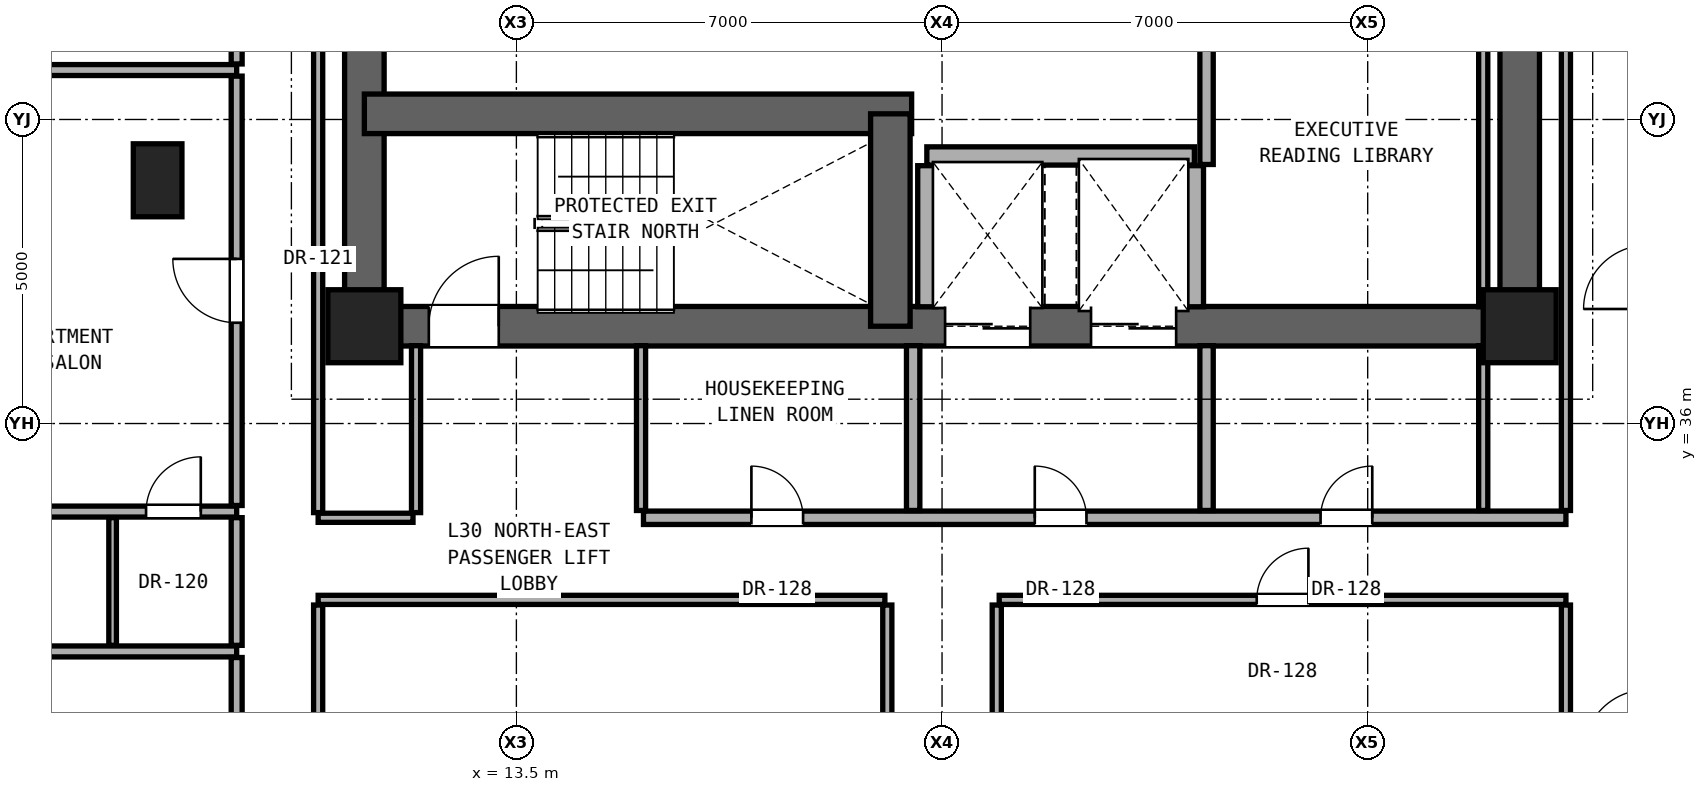
"""IFC4 building model, lengths in metres.
Left out: names, types, materials, properties, quantities, classifications, styles, units other than length and angle.
Written with IfcOpenShell. Run it as: python <this file> out.ifc"""

import sys

from ifc_helpers import new_model, si_unit, direction, frame, frame_2d, origin, origin_2d, place, context, subcontext, project, spatial, rectangle, extrude, element, fill, save


model = new_model("IFC4")
c1 = context("Model", 3, precision=1e-05, world=origin(), true_north=direction((0.0, 1.0)))
c2 = subcontext(c1, "Body", "Model", "MODEL_VIEW")
j1 = project(units=[si_unit("LENGTHUNIT", "METRE"), si_unit("PLANEANGLEUNIT", "RADIAN")], contexts=[c1])
p1 = place(None, origin())
s1 = spatial("IfcSite", under=j1, at=p1, CompositionType="ELEMENT")
p2 = place(p1, origin())
s2 = spatial("IfcBuilding", under=s1, at=p2, CompositionType="ELEMENT")
p3 = place(p2, frame((0.0, 0.0, 108.2)))
s3 = spatial("IfcBuildingStorey", under=s2, at=p3, CompositionType="ELEMENT", Elevation=108.2)
for number, where, z_axis, x_axis in (
    (1, (11.0, 37.6, 0.0), (0.0, 0.0, 1.0), (1.0, 0.0, 0.0)),
    (2, (30.0, 37.6, 0.0), (0.0, 0.0, 1.0), (1.0, 0.0, 0.0)),
):
    element("IfcColumn", number, at=place(p3, frame(where, z_axis=z_axis, x_axis=x_axis)), inside=s3, PredefinedType="COLUMN", context=c2, shape_type="SweptSolid", body=[
        extrude(rectangle(XDim=1.2, YDim=1.2, at=origin_2d()), origin(), (0.0, 0.0, 1.0), 3.3),
    ])
p4 = place(p3, frame((7.6, 40.0, 0.0), z_axis=(0.0, 0.0, 1.0), x_axis=(1.0, 0.0, 0.0)))
e3 = element("IfcColumn", 3, at=p4, inside=s3, PredefinedType="PILASTER", context=c2, shape_type="SweptSolid", body=[
    extrude(rectangle(XDim=0.8, YDim=1.2, at=origin_2d()), origin(), (0.0, 0.0, 1.0), 3.3),
])
for number, where, z_axis, x_axis in (
    (4, (11.0, 37.6, 0.0), (0.0, 0.0, 1.0), (0.0, 1.0, 0.0)),
    (5, (30.0, 37.6, 0.0), (0.0, 0.0, 1.0), (0.0, 1.0, 0.0)),
):
    element("IfcWall", number, at=place(p3, frame(where, z_axis=z_axis, x_axis=x_axis)), inside=s3, PredefinedType="SHEAR", context=c2, shape_type="SweptSolid", body=[
        extrude(rectangle(XDim=6.0, YDim=0.65, at=frame_2d((3.0, 0.0))), origin(), (0.0, 0.0, 1.0), 3.08),
    ])
p5 = place(p3, frame((11.0, 37.6, 0.0), z_axis=(0.0, 0.0, 1.0), x_axis=(1.0, 0.0, 0.0)))
e6 = element("IfcWall", 6, at=p5, inside=s3, PredefinedType="SHEAR", context=c2, shape_type="SweptSolid", body=[
    extrude(rectangle(XDim=19.0, YDim=0.65, at=frame_2d((9.5, 0.0))), origin(), (0.0, 0.0, 1.0), 3.08),
])
p6 = place(p5, frame((1.06, 0.0, 0.0)))
e7 = element("IfcOpeningElement", 7, at=p6, cuts=e6, PredefinedType="OPENING", context=c2, shape_type="SweptSolid", body=[
    extrude(rectangle(XDim=1.15, YDim=2.2, at=frame_2d((0.575, 1.1))), frame((0.0, 0.335, 0.0), z_axis=(0.0, -1.0, 0.0), x_axis=(1.0, 0.0, 0.0)), (0.0, 0.0, 1.0), 0.67),
])
p7 = place(p5, frame((9.55, 0.0, 0.0)))
e8 = element("IfcOpeningElement", 8, at=p7, cuts=e6, PredefinedType="OPENING", context=c2, shape_type="SweptSolid", body=[
    extrude(rectangle(XDim=1.4, YDim=2.35, at=frame_2d((0.7, 1.175))), frame((0.0, 0.335, 0.0), z_axis=(0.0, -1.0, 0.0), x_axis=(1.0, 0.0, 0.0)), (0.0, 0.0, 1.0), 0.67),
])
p8 = place(p5, frame((11.95, 0.0, 0.0)))
e9 = element("IfcOpeningElement", 9, at=p8, cuts=e6, PredefinedType="OPENING", context=c2, shape_type="SweptSolid", body=[
    extrude(rectangle(XDim=1.4, YDim=2.35, at=frame_2d((0.7, 1.175))), frame((0.0, 0.335, 0.0), z_axis=(0.0, -1.0, 0.0), x_axis=(1.0, 0.0, 0.0)), (0.0, 0.0, 1.0), 0.67),
])
p9 = place(p3, frame((11.0, 41.093, 0.0), z_axis=(0.0, 0.0, 1.0), x_axis=(1.0, 0.0, 0.0)))
e10 = element("IfcWall", 10, at=p9, inside=s3, PredefinedType="SHEAR", context=c2, shape_type="SweptSolid", body=[
    extrude(rectangle(XDim=9.0, YDim=0.65, at=frame_2d((4.5, 0.0))), origin(), (0.0, 0.0, 1.0), 3.08),
])
p10 = place(p3, frame((19.65, 37.6, 0.0), z_axis=(0.0, 0.0, 1.0), x_axis=(0.0, 1.0, 0.0)))
e11 = element("IfcWall", 11, at=p10, inside=s3, PredefinedType="SHEAR", context=c2, shape_type="SweptSolid", body=[
    extrude(rectangle(XDim=3.493, YDim=0.65, at=frame_2d((1.747, 0.0))), origin(), (0.0, 0.0, 1.0), 3.08),
])
p11 = place(p3, frame((-1.41, 32.252, 0.0), z_axis=(0.0, 0.0, 1.0), x_axis=(1.0, 0.0, 0.0)))
e12 = element("IfcWall", 12, at=p11, inside=s3, PredefinedType="PARTITIONING", context=c2, shape_type="SweptSolid", body=[
    extrude(rectangle(XDim=10.31, YDim=0.18, at=frame_2d((5.155, 0.0))), origin(), (0.0, 0.0, 1.0), 2.145),
])
p12 = place(p3, frame((10.24, 33.1, 0.0), z_axis=(0.0, 0.0, 1.0), x_axis=(1.0, 0.0, 0.0)))
e13 = element("IfcWall", 13, at=p12, inside=s3, PredefinedType="PARTITIONING", context=c2, shape_type="SweptSolid", body=[
    extrude(rectangle(XDim=9.32, YDim=0.15, at=frame_2d((4.66, 0.0))), origin(), (0.0, 0.0, 1.0), 2.124),
])
p13 = place(p3, frame((21.44, 33.1, 0.0), z_axis=(0.0, 0.0, 1.0), x_axis=(1.0, 0.0, 0.0)))
e14 = element("IfcWall", 14, at=p13, inside=s3, PredefinedType="PARTITIONING", context=c2, shape_type="SweptSolid", body=[
    extrude(rectangle(XDim=9.32, YDim=0.15, at=frame_2d((4.66, 0.0))), origin(), (0.0, 0.0, 1.0), 2.124),
])
p14 = place(p13, frame((4.235, 0.0, 0.0)))
e15 = element("IfcOpeningElement", 15, at=p14, cuts=e14, PredefinedType="OPENING", context=c2, shape_type="SweptSolid", body=[
    extrude(rectangle(XDim=0.85, YDim=2.01, at=frame_2d((0.425, 1.005))), frame((0.0, 0.085, 0.0), z_axis=(0.0, -1.0, 0.0), x_axis=(1.0, 0.0, 0.0)), (0.0, 0.0, 1.0), 0.17),
])
p15 = place(p3, frame((-1.41, 34.552, 0.0), z_axis=(0.0, 0.0, 1.0), x_axis=(1.0, 0.0, 0.0)))
e16 = element("IfcWall", 16, at=p15, inside=s3, PredefinedType="PARTITIONING", context=c2, shape_type="SweptSolid", body=[
    extrude(rectangle(XDim=10.31, YDim=0.18, at=frame_2d((5.155, 0.0))), origin(), (0.0, 0.0, 1.0), 2.145),
])
p16 = place(p15, frame((3.73, 0.0, 0.0)))
e17 = element("IfcOpeningElement", 17, at=p16, cuts=e16, PredefinedType="OPENING", context=c2, shape_type="SweptSolid", body=[
    extrude(rectangle(XDim=0.85, YDim=2.01, at=frame_2d((0.425, 1.005))), frame((0.0, 0.1, 0.0), z_axis=(0.0, -1.0, 0.0), x_axis=(1.0, 0.0, 0.0)), (0.0, 0.0, 1.0), 0.2),
])
p17 = place(p15, frame((8.82, 0.0, 0.0)))
e18 = element("IfcOpeningElement", 18, at=p17, cuts=e16, PredefinedType="OPENING", context=c2, shape_type="SweptSolid", body=[
    extrude(rectangle(XDim=0.9, YDim=2.1, at=frame_2d((0.45, 1.05))), frame((0.0, 0.1, 0.0), z_axis=(0.0, -1.0, 0.0), x_axis=(1.0, 0.0, 0.0)), (0.0, 0.0, 1.0), 0.2),
])
p18 = place(p3, frame((10.24, 34.45, 0.0), z_axis=(0.0, 0.0, 1.0), x_axis=(1.0, 0.0, 0.0)))
e19 = element("IfcWall", 19, at=p18, inside=s3, PredefinedType="PARTITIONING", context=c2, shape_type="SweptSolid", body=[
    extrude(rectangle(XDim=1.56, YDim=0.15, at=frame_2d((0.78, 0.0))), origin(), (0.0, 0.0, 1.0), 2.124),
])
p19 = place(p3, frame((15.59, 34.45, 0.0), z_axis=(0.0, 0.0, 1.0), x_axis=(1.0, 0.0, 0.0)))
e20 = element("IfcWall", 20, at=p19, inside=s3, PredefinedType="SOLIDWALL", context=c2, shape_type="SweptSolid", body=[
    extrude(rectangle(XDim=15.17, YDim=0.22, at=frame_2d((7.585, 0.0))), origin(), (0.0, 0.0, 1.0), 2.124),
])
p20 = place(p19, frame((6.435, 0.0, 0.0)))
e21 = element("IfcOpeningElement", 21, at=p20, cuts=e20, PredefinedType="OPENING", context=c2, shape_type="SweptSolid", body=[
    extrude(rectangle(XDim=0.85, YDim=2.01, at=frame_2d((0.425, 1.005))), frame((0.0, 0.12, 0.0), z_axis=(0.0, -1.0, 0.0), x_axis=(1.0, 0.0, 0.0)), (0.0, 0.0, 1.0), 0.24),
])
p21 = place(p19, frame((11.135, 0.0, 0.0)))
e22 = element("IfcOpeningElement", 22, at=p21, cuts=e20, PredefinedType="OPENING", context=c2, shape_type="SweptSolid", body=[
    extrude(rectangle(XDim=0.85, YDim=2.01, at=frame_2d((0.425, 1.005))), frame((0.0, 0.12, 0.0), z_axis=(0.0, -1.0, 0.0), x_axis=(1.0, 0.0, 0.0)), (0.0, 0.0, 1.0), 0.24),
])
p22 = place(p19, frame((1.775, 0.0, 0.0)))
e23 = element("IfcOpeningElement", 23, at=p22, cuts=e20, PredefinedType="OPENING", context=c2, shape_type="SweptSolid", body=[
    extrude(rectangle(XDim=0.85, YDim=2.01, at=frame_2d((0.425, 1.005))), frame((0.0, 0.12, 0.0), z_axis=(0.0, -1.0, 0.0), x_axis=(1.0, 0.0, 0.0)), (0.0, 0.0, 1.0), 0.24),
])
p23 = place(p3, frame((20.25, 40.4, 0.0), z_axis=(0.0, 0.0, 1.0), x_axis=(1.0, 0.0, 0.0)))
e24 = element("IfcWall", 24, at=p23, inside=s3, PredefinedType="SOLIDWALL", context=c2, shape_type="SweptSolid", body=[
    extrude(rectangle(XDim=4.4, YDim=0.3, at=frame_2d((2.2, 0.0))), origin(), (0.0, 0.0, 1.0), 3.08),
])
p24 = place(p3, frame((3.915, 41.813, 0.0), z_axis=(0.0, 0.0, 1.0), x_axis=(1.0, 0.0, 0.0)))
e25 = element("IfcWall", 25, at=p24, inside=s3, PredefinedType="PARTITIONING", context=c2, shape_type="SweptSolid", body=[
    extrude(rectangle(XDim=4.985, YDim=0.18, at=frame_2d((2.492, 0.0))), origin(), (0.0, 0.0, 1.0), 3.08),
])
p25 = place(p3, frame((6.86, 32.352, 0.0), z_axis=(0.0, 0.0, 1.0), x_axis=(0.0, 1.0, 0.0)))
e26 = element("IfcWall", 26, at=p25, inside=s3, PredefinedType="PARTITIONING", context=c2, shape_type="SweptSolid", body=[
    extrude(rectangle(XDim=2.1, YDim=0.125, at=frame_2d((1.05, 0.0))), origin(), (0.0, 0.0, 1.0), 3.08),
])
p26 = place(p3, frame((8.9, 27.2, 0.0), z_axis=(0.0, 0.0, 1.0), x_axis=(0.0, 1.0, 0.0)))
e27 = element("IfcWall", 27, at=p26, inside=s3, PredefinedType="PARTITIONING", context=c2, shape_type="SweptSolid", body=[
    extrude(rectangle(XDim=4.952, YDim=0.18, at=frame_2d((2.476, 0.0))), origin(), (0.0, 0.0, 1.0), 2.299),
])
p27 = place(p26, frame((1.951, 0.0, 0.0)))
e28 = element("IfcOpeningElement", 28, at=p27, cuts=e27, PredefinedType="OPENING", context=c2, shape_type="SweptSolid", body=[
    extrude(rectangle(XDim=1.05, YDim=2.2, at=frame_2d((0.525, 1.1))), frame((0.0, 0.1, 0.0), z_axis=(0.0, -1.0, 0.0), x_axis=(1.0, 0.0, 0.0)), (0.0, 0.0, 1.0), 0.2),
])
p28 = place(p3, frame((8.9, 32.352, 0.0), z_axis=(0.0, 0.0, 1.0), x_axis=(0.0, 1.0, 0.0)))
e29 = element("IfcWall", 29, at=p28, inside=s3, PredefinedType="PARTITIONING", context=c2, shape_type="SweptSolid", body=[
    extrude(rectangle(XDim=2.1, YDim=0.18, at=frame_2d((1.05, 0.0))), origin(), (0.0, 0.0, 1.0), 3.08),
])
p29 = place(p3, frame((8.9, 34.652, 0.0), z_axis=(0.0, 0.0, 1.0), x_axis=(0.0, 1.0, 0.0)))
e30 = element("IfcWall", 30, at=p29, inside=s3, PredefinedType="PARTITIONING", context=c2, shape_type="SweptSolid", body=[
    extrude(rectangle(XDim=7.061, YDim=0.18, at=frame_2d((3.53, 0.0))), origin(), (0.0, 0.0, 1.0), 2.456),
])
p30 = place(p29, frame((3.006, 0.0, 0.0)))
e31 = element("IfcOpeningElement", 31, at=p30, cuts=e30, PredefinedType="OPENING", context=c2, shape_type="SweptSolid", body=[
    extrude(rectangle(XDim=1.05, YDim=2.2, at=frame_2d((0.525, 1.1))), frame((0.0, 0.1, 0.0), z_axis=(0.0, -1.0, 0.0), x_axis=(1.0, 0.0, 0.0)), (0.0, 0.0, 1.0), 0.2),
])
p31 = place(p3, frame((8.9, 41.913, 0.0), z_axis=(0.0, 0.0, 1.0), x_axis=(0.0, 1.0, 0.0)))
e32 = element("IfcWall", 32, at=p31, inside=s3, PredefinedType="PARTITIONING", context=c2, shape_type="SweptSolid", body=[
    extrude(rectangle(XDim=5.205, YDim=0.18, at=frame_2d((2.603, 0.0))), origin(), (0.0, 0.0, 1.0), 3.08),
])
p32 = place(p31, frame((2.127, 0.0, 0.0)))
e33 = element("IfcOpeningElement", 33, at=p32, cuts=e32, PredefinedType="OPENING", context=c2, shape_type="SweptSolid", body=[
    extrude(rectangle(XDim=0.95, YDim=2.15, at=frame_2d((0.475, 1.075))), frame((0.0, 0.1, 0.0), z_axis=(0.0, -1.0, 0.0), x_axis=(1.0, 0.0, 0.0)), (0.0, 0.0, 1.0), 0.2),
])
p33 = place(p3, frame((10.24, 27.485, 0.0), z_axis=(0.0, 0.0, 1.0), x_axis=(0.0, 1.0, 0.0)))
e34 = element("IfcWall", 34, at=p33, inside=s3, PredefinedType="PARTITIONING", context=c2, shape_type="SweptSolid", body=[
    extrude(rectangle(XDim=5.53, YDim=0.15, at=frame_2d((2.765, 0.0))), origin(), (0.0, 0.0, 1.0), 2.299),
])
p34 = place(p33, frame((2.29, 0.0, 0.0)))
e35 = element("IfcOpeningElement", 35, at=p34, cuts=e34, PredefinedType="OPENING", context=c2, shape_type="SweptSolid", body=[
    extrude(rectangle(XDim=0.95, YDim=2.15, at=frame_2d((0.475, 1.075))), frame((0.0, 0.085, 0.0), z_axis=(0.0, -1.0, 0.0), x_axis=(1.0, 0.0, 0.0)), (0.0, 0.0, 1.0), 0.17),
])
p35 = place(p3, frame((10.24, 34.535, 0.0), z_axis=(0.0, 0.0, 1.0), x_axis=(0.0, 1.0, 0.0)))
e36 = element("IfcWall", 36, at=p35, inside=s3, PredefinedType="PARTITIONING", context=c2, shape_type="SweptSolid", body=[
    extrude(rectangle(XDim=9.13, YDim=0.15, at=frame_2d((4.565, 0.0))), origin(), (0.0, 0.0, 1.0), 2.456),
])
p36 = place(p3, frame((11.85, 34.535, 0.0), z_axis=(0.0, 0.0, 1.0), x_axis=(0.0, 1.0, 0.0)))
e37 = element("IfcWall", 37, at=p36, inside=s3, PredefinedType="PARTITIONING", context=c2, shape_type="SweptSolid", body=[
    extrude(rectangle(XDim=2.745, YDim=0.15, at=frame_2d((1.373, 0.0))), origin(), (0.0, 0.0, 1.0), 3.08),
])
p37 = place(p3, frame((15.55, 34.57, 0.0), z_axis=(0.0, 0.0, 1.0), x_axis=(0.0, 1.0, 0.0)))
e38 = element("IfcWall", 38, at=p37, inside=s3, PredefinedType="PARTITIONING", context=c2, shape_type="SweptSolid", body=[
    extrude(rectangle(XDim=2.71, YDim=0.15, at=frame_2d((1.355, 0.0))), origin(), (0.0, 0.0, 1.0), 2.609),
])
p38 = place(p3, frame((19.6, 27.485, 0.0), z_axis=(0.0, 0.0, 1.0), x_axis=(0.0, 1.0, 0.0)))
e39 = element("IfcWall", 39, at=p38, inside=s3, PredefinedType="PARTITIONING", context=c2, shape_type="SweptSolid", body=[
    extrude(rectangle(XDim=5.53, YDim=0.15, at=frame_2d((2.765, 0.0))), origin(), (0.0, 0.0, 1.0), 2.124),
])
p39 = place(p3, frame((20.025, 34.57, 0.0), z_axis=(0.0, 0.0, 1.0), x_axis=(0.0, 1.0, 0.0)))
e40 = element("IfcWall", 40, at=p39, inside=s3, PredefinedType="SOLIDWALL", context=c2, shape_type="SweptSolid", body=[
    extrude(rectangle(XDim=2.71, YDim=0.22, at=frame_2d((1.355, 0.0))), origin(), (0.0, 0.0, 1.0), 3.08),
])
p40 = place(p3, frame((20.25, 37.92, 0.0), z_axis=(0.0, 0.0, 1.0), x_axis=(0.0, 1.0, 0.0)))
e41 = element("IfcWall", 41, at=p40, inside=s3, PredefinedType="SOLIDWALL", context=c2, shape_type="SweptSolid", body=[
    extrude(rectangle(XDim=2.32, YDim=0.3, at=frame_2d((1.16, 0.0))), origin(), (0.0, 0.0, 1.0), 3.08),
])
p41 = place(p3, frame((21.4, 27.485, 0.0), z_axis=(0.0, 0.0, 1.0), x_axis=(0.0, 1.0, 0.0)))
e42 = element("IfcWall", 42, at=p41, inside=s3, PredefinedType="PARTITIONING", context=c2, shape_type="SweptSolid", body=[
    extrude(rectangle(XDim=5.53, YDim=0.15, at=frame_2d((2.765, 0.0))), origin(), (0.0, 0.0, 1.0), 2.124),
])
p42 = place(p3, frame((24.65, 37.92, 0.0), z_axis=(0.0, 0.0, 1.0), x_axis=(0.0, 1.0, 0.0)))
e43 = element("IfcWall", 43, at=p42, inside=s3, PredefinedType="SOLIDWALL", context=c2, shape_type="SweptSolid", body=[
    extrude(rectangle(XDim=2.32, YDim=0.3, at=frame_2d((1.16, 0.0))), origin(), (0.0, 0.0, 1.0), 3.08),
])
p43 = place(p3, frame((24.85, 34.57, 0.0), z_axis=(0.0, 0.0, 1.0), x_axis=(0.0, 1.0, 0.0)))
e44 = element("IfcWall", 44, at=p43, inside=s3, PredefinedType="SOLIDWALL", context=c2, shape_type="SweptSolid", body=[
    extrude(rectangle(XDim=2.71, YDim=0.22, at=frame_2d((1.355, 0.0))), origin(), (0.0, 0.0, 1.0), 3.08),
])
p44 = place(p3, frame((24.85, 40.26, 0.0), z_axis=(0.0, 0.0, 1.0), x_axis=(0.0, 1.0, 0.0)))
e45 = element("IfcWall", 45, at=p44, inside=s3, PredefinedType="SOLIDWALL", context=c2, shape_type="SweptSolid", body=[
    extrude(rectangle(XDim=2.94, YDim=0.22, at=frame_2d((1.47, 0.0))), origin(), (0.0, 0.0, 1.0), 3.08),
])
p45 = place(p3, frame((29.4, 34.57, 0.0), z_axis=(0.0, 0.0, 1.0), x_axis=(0.0, 1.0, 0.0)))
e46 = element("IfcWall", 46, at=p45, inside=s3, PredefinedType="PARTITIONING", context=c2, shape_type="SweptSolid", body=[
    extrude(rectangle(XDim=2.71, YDim=0.15, at=frame_2d((1.355, 0.0))), origin(), (0.0, 0.0, 1.0), 3.08),
])
p46 = place(p3, frame((29.4, 37.92, 0.0), z_axis=(0.0, 0.0, 1.0), x_axis=(0.0, 1.0, 0.0)))
e47 = element("IfcWall", 47, at=p46, inside=s3, PredefinedType="PARTITIONING", context=c2, shape_type="SweptSolid", body=[
    extrude(rectangle(XDim=5.28, YDim=0.15, at=frame_2d((2.64, 0.0))), origin(), (0.0, 0.0, 1.0), 3.08),
])
p47 = place(p3, frame((30.76, 27.485, 0.0), z_axis=(0.0, 0.0, 1.0), x_axis=(0.0, 1.0, 0.0)))
e48 = element("IfcWall", 48, at=p47, inside=s3, PredefinedType="PARTITIONING", context=c2, shape_type="SweptSolid", body=[
    extrude(rectangle(XDim=5.53, YDim=0.15, at=frame_2d((2.765, 0.0))), origin(), (0.0, 0.0, 1.0), 2.299),
])
p48 = place(p3, frame((30.76, 34.57, 0.0), z_axis=(0.0, 0.0, 1.0), x_axis=(0.0, 1.0, 0.0)))
e49 = element("IfcWall", 49, at=p48, inside=s3, PredefinedType="PARTITIONING", context=c2, shape_type="SweptSolid", body=[
    extrude(rectangle(XDim=9.095, YDim=0.15, at=frame_2d((4.547, 0.0))), origin(), (0.0, 0.0, 1.0), 2.456),
])
p49 = place(p6, origin())
e50 = element("IfcDoor", 50, at=p49, inside=s3, OperationType="SINGLE_SWING_RIGHT", PredefinedType="DOOR", context=c2, shape_type="SweptSolid", body=[
    extrude(rectangle(XDim=1.15, YDim=2.2, at=frame_2d((0.575, 1.1))), frame((0.0, 0.025, 0.0), z_axis=(0.0, -1.0, 0.0), x_axis=(1.0, 0.0, 0.0)), (0.0, 0.0, 1.0), 0.05),
])
fill(e7, e50)
p50 = place(p20, origin())
e51 = element("IfcDoor", 51, at=p50, inside=s3, OperationType="SINGLE_SWING_LEFT", PredefinedType="DOOR", context=c2, shape_type="SweptSolid", body=[
    extrude(rectangle(XDim=0.85, YDim=2.01, at=frame_2d((0.425, 1.005))), frame((0.0, 0.025, 0.0), z_axis=(0.0, -1.0, 0.0), x_axis=(1.0, 0.0, 0.0)), (0.0, 0.0, 1.0), 0.05),
])
fill(e21, e51)
p51 = place(p21, origin())
e52 = element("IfcDoor", 52, at=p51, inside=s3, OperationType="SINGLE_SWING_RIGHT", PredefinedType="DOOR", context=c2, shape_type="SweptSolid", body=[
    extrude(rectangle(XDim=0.85, YDim=2.01, at=frame_2d((0.425, 1.005))), frame((0.0, 0.025, 0.0), z_axis=(0.0, -1.0, 0.0), x_axis=(1.0, 0.0, 0.0)), (0.0, 0.0, 1.0), 0.05),
])
fill(e22, e52)
p52 = place(p22, origin())
e53 = element("IfcDoor", 53, at=p52, inside=s3, OperationType="SINGLE_SWING_LEFT", PredefinedType="DOOR", context=c2, shape_type="SweptSolid", body=[
    extrude(rectangle(XDim=0.85, YDim=2.01, at=frame_2d((0.425, 1.005))), frame((0.0, 0.025, 0.0), z_axis=(0.0, -1.0, 0.0), x_axis=(1.0, 0.0, 0.0)), (0.0, 0.0, 1.0), 0.05),
])
fill(e23, e53)
p53 = place(p30, origin())
e54 = element("IfcDoor", 54, at=p53, inside=s3, OperationType="SINGLE_SWING_RIGHT", PredefinedType="DOOR", context=c2, shape_type="SweptSolid", body=[
    extrude(rectangle(XDim=1.05, YDim=2.2, at=frame_2d((0.525, 1.1))), frame((0.0, 0.025, 0.0), z_axis=(0.0, -1.0, 0.0), x_axis=(1.0, 0.0, 0.0)), (0.0, 0.0, 1.0), 0.05),
])
fill(e31, e54)
p54 = place(p17, origin())
e55 = element("IfcDoor", 55, at=p54, inside=s3, OperationType="SINGLE_SWING_RIGHT", PredefinedType="DOOR", context=c2, shape_type="SweptSolid", body=[
    extrude(rectangle(XDim=0.9, YDim=2.1, at=frame_2d((0.45, 1.05))), frame((0.0, 0.025, 0.0), z_axis=(0.0, -1.0, 0.0), x_axis=(1.0, 0.0, 0.0)), (0.0, 0.0, 1.0), 0.05),
])
fill(e18, e55)
p55 = place(p14, origin())
e56 = element("IfcDoor", 56, at=p55, inside=s3, OperationType="SINGLE_SWING_RIGHT", PredefinedType="DOOR", context=c2, shape_type="SweptSolid", body=[
    extrude(rectangle(XDim=0.85, YDim=2.01, at=frame_2d((0.425, 1.005))), frame((0.0, 0.025, 0.0), z_axis=(0.0, -1.0, 0.0), x_axis=(1.0, 0.0, 0.0)), (0.0, 0.0, 1.0), 0.05),
])
fill(e15, e56)
p56 = place(p7, origin())
e57 = element("IfcDoor", 57, at=p56, inside=s3, OperationType="DOUBLE_DOOR_SLIDING", PredefinedType="DOOR", context=c2, shape_type="SweptSolid", body=[
    extrude(rectangle(XDim=1.4, YDim=2.35, at=frame_2d((0.7, 1.175))), frame((0.0, 0.025, 0.0), z_axis=(0.0, -1.0, 0.0), x_axis=(1.0, 0.0, 0.0)), (0.0, 0.0, 1.0), 0.05),
])
fill(e8, e57)
p57 = place(p8, origin())
e58 = element("IfcDoor", 58, at=p57, inside=s3, OperationType="DOUBLE_DOOR_SLIDING", PredefinedType="DOOR", context=c2, shape_type="SweptSolid", body=[
    extrude(rectangle(XDim=1.4, YDim=2.35, at=frame_2d((0.7, 1.175))), frame((0.0, 0.025, 0.0), z_axis=(0.0, -1.0, 0.0), x_axis=(1.0, 0.0, 0.0)), (0.0, 0.0, 1.0), 0.05),
])
fill(e9, e58)
save(model, sys.argv[1])
